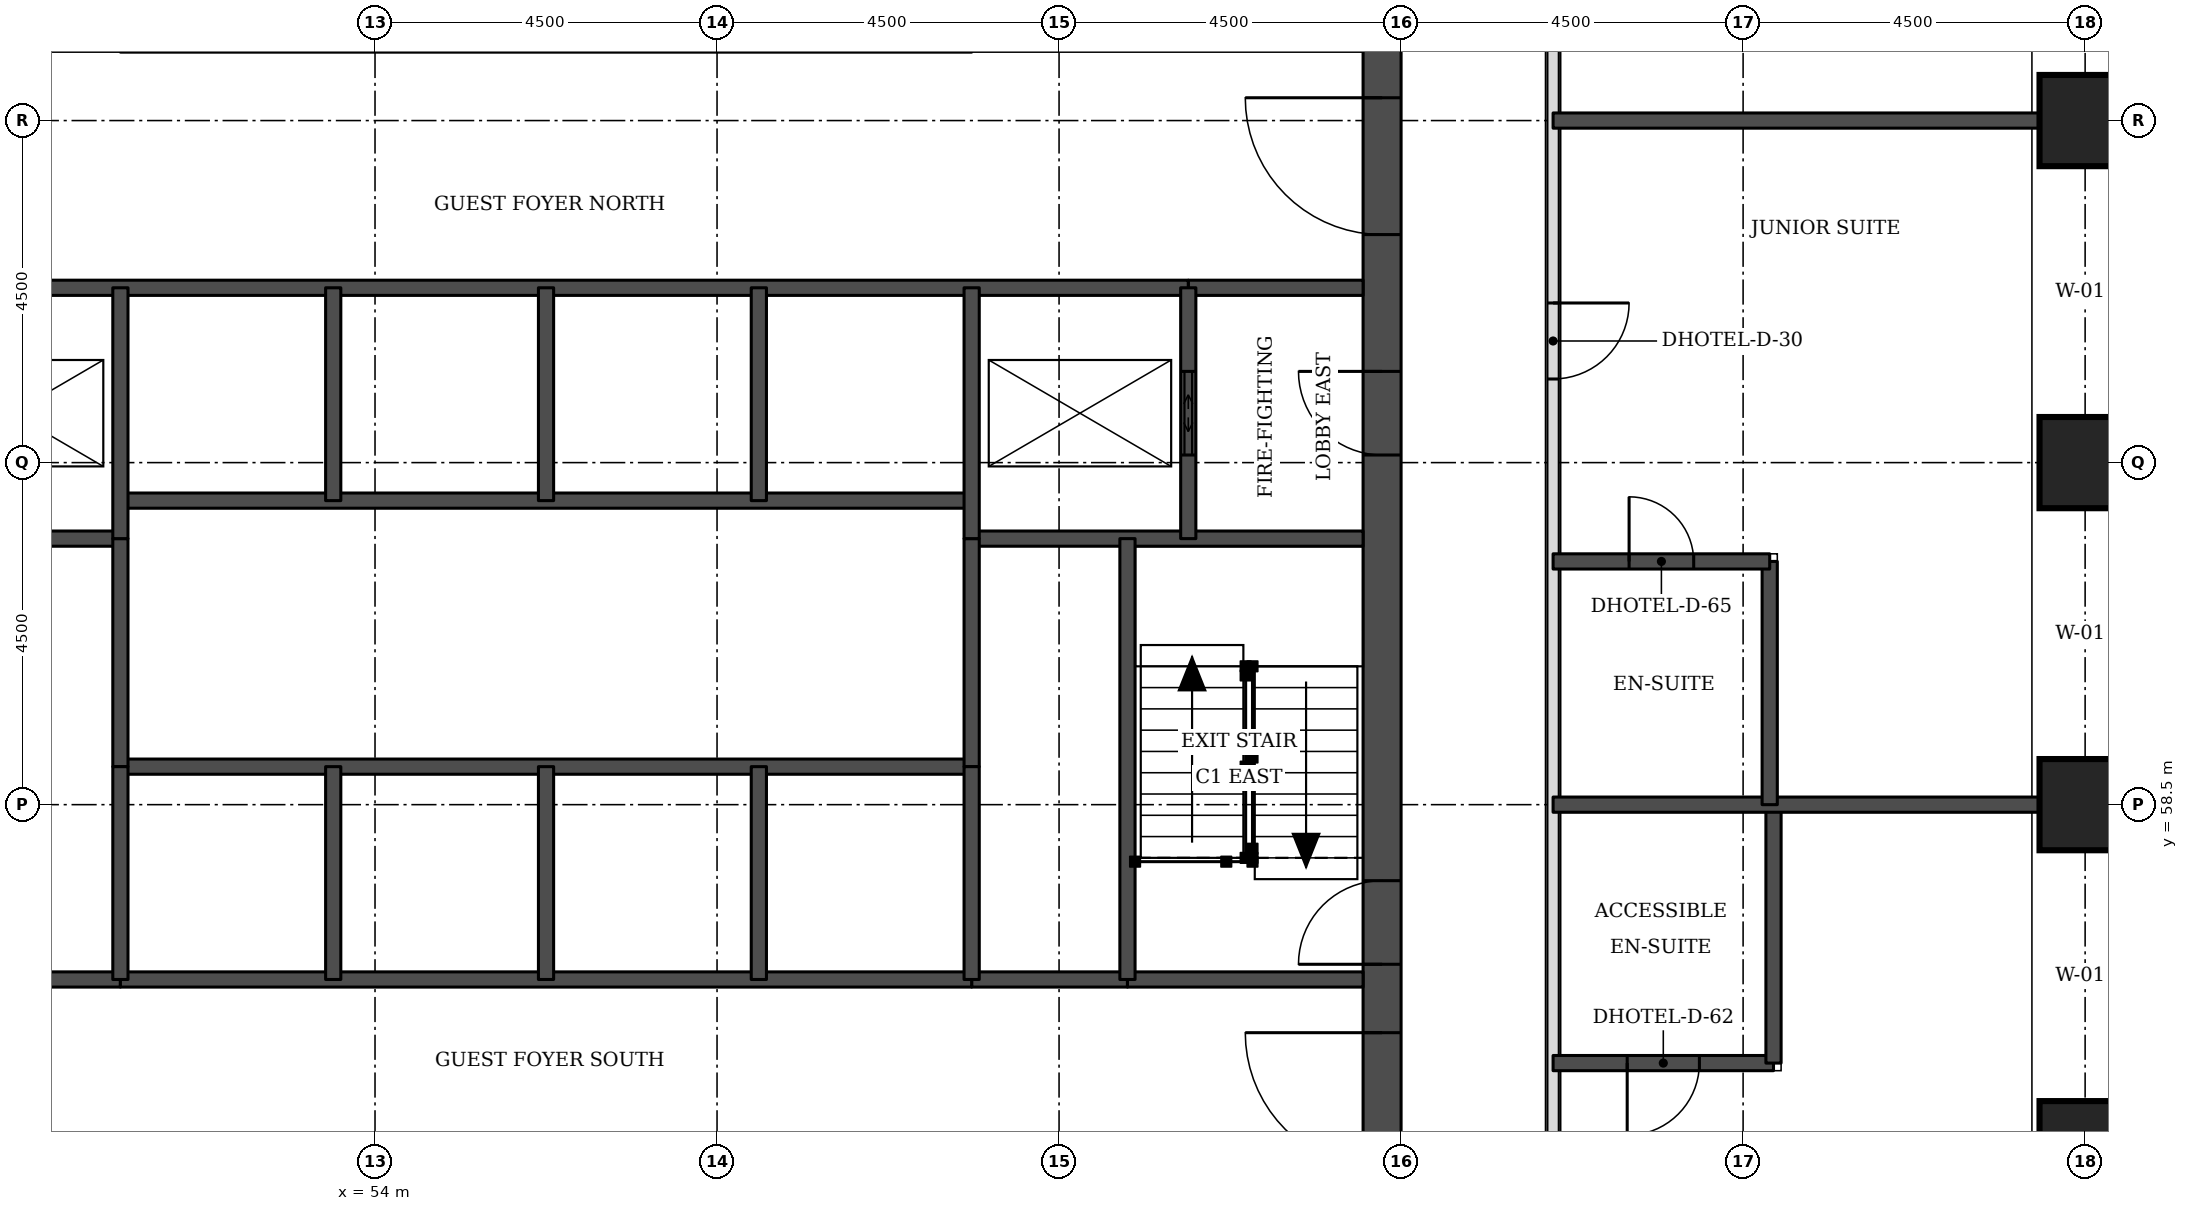
"""IFC4 building model, lengths in metres.
Left out: names, types, materials, properties, quantities, classifications, styles, units other than length and angle.
Written with IfcOpenShell. Run it as: python <this file> out.ifc"""

import sys

from ifc_helpers import new_model, si_unit, direction, frame, frame_2d, origin, origin_2d, place, context, subcontext, project, spatial, rectangle, extrude, element, fill, save


model = new_model("IFC4")
c1 = context("Model", 3, precision=1e-05, world=origin(), true_north=direction((0.0, 1.0)))
c2 = subcontext(c1, "Body", "Model", "MODEL_VIEW")
j1 = project(units=[si_unit("LENGTHUNIT", "METRE"), si_unit("PLANEANGLEUNIT", "RADIAN")], contexts=[c1])
p1 = place(None, origin())
s1 = spatial("IfcSite", under=j1, at=p1, CompositionType="ELEMENT")
p2 = place(p1, origin())
s2 = spatial("IfcBuilding", under=s1, at=p2, CompositionType="ELEMENT")
p3 = place(p2, frame((0.0, 0.0, 36.3)))
s3 = spatial("IfcBuildingStorey", under=s2, at=p3, CompositionType="ELEMENT", Elevation=36.3)
for number, where, z_axis, x_axis in (
    (1, (76.5, 54.0, 0.0), (0.0, 0.0, 1.0), (1.0, 0.0, 0.0)),
    (2, (76.5, 58.5, 0.0), (0.0, 0.0, 1.0), (1.0, 0.0, 0.0)),
    (3, (76.5, 63.0, 0.0), (0.0, 0.0, 1.0), (1.0, 0.0, 0.0)),
    (4, (76.5, 67.5, 0.0), (0.0, 0.0, 1.0), (1.0, 0.0, 0.0)),
):
    element("IfcColumn", number, at=place(p3, frame(where, z_axis=z_axis, x_axis=x_axis)), inside=s3, PredefinedType="COLUMN", context=c2, shape_type="SweptSolid", body=[
        extrude(rectangle(XDim=1.2, YDim=1.2, at=origin_2d()), origin(), (0.0, 0.0, 1.0), 3.3),
    ])
p4 = place(p3, frame((67.25, 49.5, 0.0), z_axis=(0.0, 0.0, 1.0), x_axis=(0.0, 1.0, 0.0)))
e5 = element("IfcWall", 5, at=p4, inside=s3, PredefinedType="SHEAR", context=c2, shape_type="SweptSolid", body=[
    extrude(rectangle(XDim=22.5, YDim=0.5, at=frame_2d((11.25, 0.0))), origin(), (0.0, 0.0, 1.0), 3.3),
])
p5 = place(p4, frame((4.2, 0.0, 0.0)))
e6 = element("IfcOpeningElement", 6, at=p5, cuts=e5, PredefinedType="OPENING", context=c2, shape_type="SweptSolid", body=[
    extrude(rectangle(XDim=1.8, YDim=2.1, at=frame_2d((0.9, 1.05))), frame((0.0, 0.26, 0.0), z_axis=(0.0, -1.0, 0.0), x_axis=(1.0, 0.0, 0.0)), (0.0, 0.0, 1.0), 0.52),
])
p6 = place(p4, frame((6.9, 0.0, 0.0)))
e7 = element("IfcOpeningElement", 7, at=p6, cuts=e5, PredefinedType="OPENING", context=c2, shape_type="SweptSolid", body=[
    extrude(rectangle(XDim=1.1, YDim=2.1, at=frame_2d((0.55, 1.05))), frame((0.0, 0.26, 0.0), z_axis=(0.0, -1.0, 0.0), x_axis=(1.0, 0.0, 0.0)), (0.0, 0.0, 1.0), 0.52),
])
p7 = place(p4, frame((13.6, 0.0, 0.0)))
e8 = element("IfcOpeningElement", 8, at=p7, cuts=e5, PredefinedType="OPENING", context=c2, shape_type="SweptSolid", body=[
    extrude(rectangle(XDim=1.1, YDim=2.1, at=frame_2d((0.55, 1.05))), frame((0.0, 0.26, 0.0), z_axis=(0.0, -1.0, 0.0), x_axis=(1.0, 0.0, 0.0)), (0.0, 0.0, 1.0), 0.52),
])
p8 = place(p4, frame((16.5, 0.0, 0.0)))
e9 = element("IfcOpeningElement", 9, at=p8, cuts=e5, PredefinedType="OPENING", context=c2, shape_type="SweptSolid", body=[
    extrude(rectangle(XDim=1.8, YDim=2.1, at=frame_2d((0.9, 1.05))), frame((0.0, 0.26, 0.0), z_axis=(0.0, -1.0, 0.0), x_axis=(1.0, 0.0, 0.0)), (0.0, 0.0, 1.0), 0.52),
])
p9 = place(p3, frame((69.5, 47.5, 0.0), z_axis=(0.0, 0.0, 1.0), x_axis=(0.0, 1.0, 0.0)))
e10 = element("IfcWall", 10, at=p9, inside=s3, PredefinedType="PARTITIONING", context=c2, shape_type="SweptSolid", body=[
    extrude(rectangle(XDim=26.5, YDim=0.15, at=frame_2d((13.25, 0.0))), origin(), (0.0, 0.0, 1.0), 3.08),
])
p10 = place(p9, frame((22.65, 0.0, 0.0)))
e11 = element("IfcOpeningElement", 11, at=p10, cuts=e10, PredefinedType="OPENING", context=c2, shape_type="SweptSolid", body=[
    extrude(rectangle(XDim=1.0, YDim=2.1, at=frame_2d((0.5, 1.05))), frame((0.0, 0.085, 0.0), z_axis=(0.0, -1.0, 0.0), x_axis=(1.0, 0.0, 0.0)), (0.0, 0.0, 1.0), 0.17),
])
p11 = place(p9, frame((16.6, 0.0, 0.0)))
e12 = element("IfcOpeningElement", 12, at=p11, cuts=e10, PredefinedType="OPENING", context=c2, shape_type="SweptSolid", body=[
    extrude(rectangle(XDim=1.0, YDim=2.1, at=frame_2d((0.5, 1.05))), frame((0.0, 0.085, 0.0), z_axis=(0.0, -1.0, 0.0), x_axis=(1.0, 0.0, 0.0)), (0.0, 0.0, 1.0), 0.17),
])
p12 = place(p9, frame((4.25, 0.0, 0.0)))
e13 = element("IfcOpeningElement", 13, at=p12, cuts=e10, PredefinedType="OPENING", context=c2, shape_type="SweptSolid", body=[
    extrude(rectangle(XDim=1.1, YDim=2.1, at=frame_2d((0.55, 1.05))), frame((0.0, 0.085, 0.0), z_axis=(0.0, -1.0, 0.0), x_axis=(1.0, 0.0, 0.0)), (0.0, 0.0, 1.0), 0.17),
])
p13 = place(p9, frame((0.55, 0.0, 0.0)))
e14 = element("IfcOpeningElement", 14, at=p13, cuts=e10, PredefinedType="OPENING", context=c2, shape_type="SweptSolid", body=[
    extrude(rectangle(XDim=1.0, YDim=2.1, at=frame_2d((0.5, 1.05))), frame((0.0, 0.085, 0.0), z_axis=(0.0, -1.0, 0.0), x_axis=(1.0, 0.0, 0.0)), (0.0, 0.0, 1.0), 0.17),
])
p14 = place(p3, frame((69.5, 55.1, 0.0), z_axis=(0.0, 0.0, 1.0), x_axis=(1.0, 0.0, 0.0)))
e15 = element("IfcWall", 15, at=p14, inside=s3, PredefinedType="SOLIDWALL", context=c2, shape_type="SweptSolid", body=[
    extrude(rectangle(XDim=2.9, YDim=0.2, at=frame_2d((1.45, 0.0))), origin(), (0.0, 0.0, 1.0), 3.08),
])
p15 = place(p14, frame((0.975, 0.0, 0.0)))
e16 = element("IfcOpeningElement", 16, at=p15, cuts=e15, PredefinedType="OPENING", context=c2, shape_type="SweptSolid", body=[
    extrude(rectangle(XDim=0.95, YDim=2.1, at=frame_2d((0.475, 1.05))), frame((0.0, 0.11, 0.0), z_axis=(0.0, -1.0, 0.0), x_axis=(1.0, 0.0, 0.0)), (0.0, 0.0, 1.0), 0.22),
])
p16 = place(p3, frame((72.4, 55.1, 0.0), z_axis=(0.0, 0.0, 1.0), x_axis=(0.0, 1.0, 0.0)))
e17 = element("IfcWall", 17, at=p16, inside=s3, PredefinedType="SOLIDWALL", context=c2, shape_type="SweptSolid", body=[
    extrude(rectangle(XDim=3.4, YDim=0.2, at=frame_2d((1.7, 0.0))), origin(), (0.0, 0.0, 1.0), 3.08),
])
p17 = place(p3, frame((69.5, 58.5, 0.0), z_axis=(0.0, 0.0, 1.0), x_axis=(1.0, 0.0, 0.0)))
e18 = element("IfcWall", 18, at=p17, inside=s3, PredefinedType="SOLIDWALL", context=c2, shape_type="SweptSolid", body=[
    extrude(rectangle(XDim=6.4, YDim=0.2, at=frame_2d((3.2, 0.0))), origin(), (0.0, 0.0, 1.0), 3.08),
])
p18 = place(p3, frame((72.35, 58.5, 0.0), z_axis=(0.0, 0.0, 1.0), x_axis=(0.0, 1.0, 0.0)))
e19 = element("IfcWall", 19, at=p18, inside=s3, PredefinedType="SOLIDWALL", context=c2, shape_type="SweptSolid", body=[
    extrude(rectangle(XDim=3.2, YDim=0.2, at=frame_2d((1.6, 0.0))), origin(), (0.0, 0.0, 1.0), 3.08),
])
p19 = place(p3, frame((69.5, 61.7, 0.0), z_axis=(0.0, 0.0, 1.0), x_axis=(1.0, 0.0, 0.0)))
e20 = element("IfcWall", 20, at=p19, inside=s3, PredefinedType="SOLIDWALL", context=c2, shape_type="SweptSolid", body=[
    extrude(rectangle(XDim=2.85, YDim=0.2, at=frame_2d((1.425, 0.0))), origin(), (0.0, 0.0, 1.0), 3.08),
])
p20 = place(p19, frame((1.0, 0.0, 0.0)))
e21 = element("IfcOpeningElement", 21, at=p20, cuts=e20, PredefinedType="OPENING", context=c2, shape_type="SweptSolid", body=[
    extrude(rectangle(XDim=0.85, YDim=2.1, at=frame_2d((0.425, 1.05))), frame((0.0, 0.11, 0.0), z_axis=(0.0, -1.0, 0.0), x_axis=(1.0, 0.0, 0.0)), (0.0, 0.0, 1.0), 0.22),
])
p21 = place(p3, frame((69.5, 67.5, 0.0), z_axis=(0.0, 0.0, 1.0), x_axis=(1.0, 0.0, 0.0)))
e22 = element("IfcWall", 22, at=p21, inside=s3, PredefinedType="SOLIDWALL", context=c2, shape_type="SweptSolid", body=[
    extrude(rectangle(XDim=6.4, YDim=0.2, at=frame_2d((3.2, 0.0))), origin(), (0.0, 0.0, 1.0), 3.08),
])
for number, where, z_axis, x_axis in (
    (23, (48.6, 56.2, 0.0), (0.0, 0.0, 1.0), (1.0, 0.0, 0.0)),
    (24, (61.85, 56.2, 0.0), (0.0, 0.0, 1.0), (1.0, 0.0, 0.0)),
):
    element("IfcWall", number, at=place(p3, frame(where, z_axis=z_axis, x_axis=x_axis)), inside=s3, PredefinedType="SOLIDWALL", context=c2, shape_type="SweptSolid", body=[
        extrude(rectangle(XDim=2.05, YDim=0.2, at=frame_2d((1.025, 0.0))), origin(), (0.0, 0.0, 1.0), 3.08),
    ])
p22 = place(p3, frame((50.65, 56.2, 0.0), z_axis=(0.0, 0.0, 1.0), x_axis=(1.0, 0.0, 0.0)))
e25 = element("IfcWall", 25, at=p22, inside=s3, PredefinedType="SOLIDWALL", context=c2, shape_type="SweptSolid", body=[
    extrude(rectangle(XDim=11.2, YDim=0.2, at=frame_2d((5.6, 0.0))), origin(), (0.0, 0.0, 1.0), 3.08),
])
p23 = place(p3, frame((63.9, 56.2, 0.0), z_axis=(0.0, 0.0, 1.0), x_axis=(1.0, 0.0, 0.0)))
e26 = element("IfcWall", 26, at=p23, inside=s3, PredefinedType="SOLIDWALL", context=c2, shape_type="SweptSolid", body=[
    extrude(rectangle(XDim=3.1, YDim=0.2, at=frame_2d((1.55, 0.0))), origin(), (0.0, 0.0, 1.0), 3.08),
])
p24 = place(p3, frame((50.65, 59.0, 0.0), z_axis=(0.0, 0.0, 1.0), x_axis=(1.0, 0.0, 0.0)))
e27 = element("IfcWall", 27, at=p24, inside=s3, PredefinedType="SOLIDWALL", context=c2, shape_type="SweptSolid", body=[
    extrude(rectangle(XDim=11.2, YDim=0.2, at=frame_2d((5.6, 0.0))), origin(), (0.0, 0.0, 1.0), 3.3),
])
for number, where, z_axis, x_axis in (
    (28, (45.5, 62.0, 0.0), (0.0, 0.0, 1.0), (1.0, 0.0, 0.0)),
    (29, (61.85, 62.0, 0.0), (0.0, 0.0, 1.0), (1.0, 0.0, 0.0)),
):
    element("IfcWall", number, at=place(p3, frame(where, z_axis=z_axis, x_axis=x_axis)), inside=s3, PredefinedType="SOLIDWALL", context=c2, shape_type="SweptSolid", body=[
        extrude(rectangle(XDim=5.15, YDim=0.2, at=frame_2d((2.575, 0.0))), origin(), (0.0, 0.0, 1.0), 3.08),
    ])
p25 = place(p3, frame((50.65, 62.5, 0.0), z_axis=(0.0, 0.0, 1.0), x_axis=(1.0, 0.0, 0.0)))
e30 = element("IfcWall", 30, at=p25, inside=s3, PredefinedType="SOLIDWALL", context=c2, shape_type="SweptSolid", body=[
    extrude(rectangle(XDim=11.2, YDim=0.2, at=frame_2d((5.6, 0.0))), origin(), (0.0, 0.0, 1.0), 3.3),
])
p26 = place(p3, frame((64.7, 65.3, 0.0), z_axis=(0.0, 0.0, 1.0), x_axis=(1.0, 0.0, 0.0)))
e31 = element("IfcWall", 31, at=p26, inside=s3, PredefinedType="SOLIDWALL", context=c2, shape_type="SweptSolid", body=[
    extrude(rectangle(XDim=2.3, YDim=0.2, at=frame_2d((1.15, 0.0))), origin(), (0.0, 0.0, 1.0), 3.08),
])
p27 = place(p3, frame((47.8, 65.3, 0.0), z_axis=(0.0, 0.0, 1.0), x_axis=(1.0, 0.0, 0.0)))
e32 = element("IfcWall", 32, at=p27, inside=s3, PredefinedType="SOLIDWALL", context=c2, shape_type="SweptSolid", body=[
    extrude(rectangle(XDim=16.9, YDim=0.2, at=frame_2d((8.45, 0.0))), origin(), (0.0, 0.0, 1.0), 3.08),
])
p28 = place(p3, frame((50.65, 59.0, 0.0), z_axis=(0.0, 0.0, 1.0), x_axis=(0.0, 1.0, 0.0)))
e33 = element("IfcWall", 33, at=p28, inside=s3, PredefinedType="SOLIDWALL", context=c2, shape_type="SweptSolid", body=[
    extrude(rectangle(XDim=3.0, YDim=0.2, at=frame_2d((1.5, 0.0))), origin(), (0.0, 0.0, 1.0), 3.3),
])
p29 = place(p3, frame((50.65, 56.2, 0.0), z_axis=(0.0, 0.0, 1.0), x_axis=(0.0, 1.0, 0.0)))
e34 = element("IfcWall", 34, at=p29, inside=s3, PredefinedType="SOLIDWALL", context=c2, shape_type="SweptSolid", body=[
    extrude(rectangle(XDim=2.8, YDim=0.2, at=frame_2d((1.4, 0.0))), origin(), (0.0, 0.0, 1.0), 3.08),
])
p30 = place(p3, frame((50.65, 62.0, 0.0), z_axis=(0.0, 0.0, 1.0), x_axis=(0.0, 1.0, 0.0)))
e35 = element("IfcWall", 35, at=p30, inside=s3, PredefinedType="SOLIDWALL", context=c2, shape_type="SweptSolid", body=[
    extrude(rectangle(XDim=3.3, YDim=0.2, at=frame_2d((1.65, 0.0))), origin(), (0.0, 0.0, 1.0), 3.08),
])
for number, where, z_axis, x_axis in (
    (36, (53.45, 56.2, 0.0), (0.0, 0.0, 1.0), (0.0, 1.0, 0.0)),
    (37, (53.45, 62.5, 0.0), (0.0, 0.0, 1.0), (0.0, 1.0, 0.0)),
    (38, (56.25, 56.2, 0.0), (0.0, 0.0, 1.0), (0.0, 1.0, 0.0)),
    (39, (56.25, 62.5, 0.0), (0.0, 0.0, 1.0), (0.0, 1.0, 0.0)),
    (40, (59.05, 56.2, 0.0), (0.0, 0.0, 1.0), (0.0, 1.0, 0.0)),
    (41, (59.05, 62.5, 0.0), (0.0, 0.0, 1.0), (0.0, 1.0, 0.0)),
):
    element("IfcWall", number, at=place(p3, frame(where, z_axis=z_axis, x_axis=x_axis)), inside=s3, PredefinedType="SOLIDWALL", context=c2, shape_type="SweptSolid", body=[
        extrude(rectangle(XDim=2.8, YDim=0.2, at=frame_2d((1.4, 0.0))), origin(), (0.0, 0.0, 1.0), 3.08),
    ])
p31 = place(p3, frame((61.85, 59.0, 0.0), z_axis=(0.0, 0.0, 1.0), x_axis=(0.0, 1.0, 0.0)))
e42 = element("IfcWall", 42, at=p31, inside=s3, PredefinedType="SOLIDWALL", context=c2, shape_type="SweptSolid", body=[
    extrude(rectangle(XDim=3.0, YDim=0.2, at=frame_2d((1.5, 0.0))), origin(), (0.0, 0.0, 1.0), 3.3),
])
p32 = place(p3, frame((61.85, 56.2, 0.0), z_axis=(0.0, 0.0, 1.0), x_axis=(0.0, 1.0, 0.0)))
e43 = element("IfcWall", 43, at=p32, inside=s3, PredefinedType="SOLIDWALL", context=c2, shape_type="SweptSolid", body=[
    extrude(rectangle(XDim=2.8, YDim=0.2, at=frame_2d((1.4, 0.0))), origin(), (0.0, 0.0, 1.0), 3.08),
])
p33 = place(p3, frame((61.85, 62.0, 0.0), z_axis=(0.0, 0.0, 1.0), x_axis=(0.0, 1.0, 0.0)))
e44 = element("IfcWall", 44, at=p33, inside=s3, PredefinedType="SOLIDWALL", context=c2, shape_type="SweptSolid", body=[
    extrude(rectangle(XDim=3.3, YDim=0.2, at=frame_2d((1.65, 0.0))), origin(), (0.0, 0.0, 1.0), 3.08),
])
p34 = place(p3, frame((63.9, 56.2, 0.0), z_axis=(0.0, 0.0, 1.0), x_axis=(0.0, 1.0, 0.0)))
e45 = element("IfcWall", 45, at=p34, inside=s3, PredefinedType="SOLIDWALL", context=c2, shape_type="SweptSolid", body=[
    extrude(rectangle(XDim=5.8, YDim=0.2, at=frame_2d((2.9, 0.0))), origin(), (0.0, 0.0, 1.0), 3.08),
])
p35 = place(p3, frame((64.7, 62.0, 0.0), z_axis=(0.0, 0.0, 1.0), x_axis=(0.0, 1.0, 0.0)))
e46 = element("IfcWall", 46, at=p35, inside=s3, PredefinedType="SOLIDWALL", context=c2, shape_type="SweptSolid", body=[
    extrude(rectangle(XDim=3.3, YDim=0.2, at=frame_2d((1.65, 0.0))), origin(), (0.0, 0.0, 1.0), 3.08),
])
p36 = place(p35, frame((1.1, 0.0, 0.0)))
e47 = element("IfcOpeningElement", 47, at=p36, cuts=e46, PredefinedType="OPENING", context=c2, shape_type="SweptSolid", body=[
    extrude(rectangle(XDim=1.1, YDim=2.1, at=frame_2d((0.55, 1.05))), frame((0.0, 0.11, 0.0), z_axis=(0.0, -1.0, 0.0), x_axis=(1.0, 0.0, 0.0)), (0.0, 0.0, 1.0), 0.22),
])
p37 = place(p11, frame((1.0, 0.0, 0.0), z_axis=(0.0, 0.0, 1.0), x_axis=(-1.0, 0.0, 0.0)))
e48 = element("IfcDoor", 48, at=p37, inside=s3, OperationType="SINGLE_SWING_LEFT", PredefinedType="DOOR", context=c2, shape_type="SweptSolid", body=[
    extrude(rectangle(XDim=1.0, YDim=2.1, at=frame_2d((0.5, 1.05))), frame((0.0, 0.025, 0.0), z_axis=(0.0, -1.0, 0.0), x_axis=(1.0, 0.0, 0.0)), (0.0, 0.0, 1.0), 0.05),
])
fill(e12, e48)
p38 = place(p20, origin())
e49 = element("IfcDoor", 49, at=p38, inside=s3, OperationType="SINGLE_SWING_LEFT", PredefinedType="DOOR", context=c2, shape_type="SweptSolid", body=[
    extrude(rectangle(XDim=0.85, YDim=2.1, at=frame_2d((0.425, 1.05))), frame((0.0, 0.025, 0.0), z_axis=(0.0, -1.0, 0.0), x_axis=(1.0, 0.0, 0.0)), (0.0, 0.0, 1.0), 0.05),
])
fill(e21, e49)
p39 = place(p15, frame((0.95, 0.0, 0.0), z_axis=(0.0, 0.0, 1.0), x_axis=(-1.0, 0.0, 0.0)))
e50 = element("IfcDoor", 50, at=p39, inside=s3, OperationType="SINGLE_SWING_RIGHT", PredefinedType="DOOR", context=c2, shape_type="SweptSolid", body=[
    extrude(rectangle(XDim=0.95, YDim=2.1, at=frame_2d((0.475, 1.05))), frame((0.0, 0.025, 0.0), z_axis=(0.0, -1.0, 0.0), x_axis=(1.0, 0.0, 0.0)), (0.0, 0.0, 1.0), 0.05),
])
fill(e16, e50)
p40 = place(p36, origin())
e51 = element("IfcDoor", 51, at=p40, inside=s3, OperationType="DOUBLE_DOOR_SLIDING", PredefinedType="DOOR", context=c2, shape_type="SweptSolid", body=[
    extrude(rectangle(XDim=1.1, YDim=2.1, at=frame_2d((0.55, 1.05))), frame((0.0, 0.025, 0.0), z_axis=(0.0, -1.0, 0.0), x_axis=(1.0, 0.0, 0.0)), (0.0, 0.0, 1.0), 0.05),
])
fill(e47, e51)
p41 = place(p5, origin())
e52 = element("IfcDoor", 52, at=p41, inside=s3, OperationType="SINGLE_SWING_RIGHT", PredefinedType="DOOR", context=c2, shape_type="SweptSolid", body=[
    extrude(rectangle(XDim=1.8, YDim=2.1, at=frame_2d((0.9, 1.05))), frame((0.0, 0.025, 0.0), z_axis=(0.0, -1.0, 0.0), x_axis=(1.0, 0.0, 0.0)), (0.0, 0.0, 1.0), 0.05),
])
fill(e6, e52)
p42 = place(p6, origin())
e53 = element("IfcDoor", 53, at=p42, inside=s3, OperationType="SINGLE_SWING_LEFT", PredefinedType="DOOR", context=c2, shape_type="SweptSolid", body=[
    extrude(rectangle(XDim=1.1, YDim=2.1, at=frame_2d((0.55, 1.05))), frame((0.0, 0.025, 0.0), z_axis=(0.0, -1.0, 0.0), x_axis=(1.0, 0.0, 0.0)), (0.0, 0.0, 1.0), 0.05),
])
fill(e7, e53)
p43 = place(p7, origin())
e54 = element("IfcDoor", 54, at=p43, inside=s3, OperationType="SINGLE_SWING_RIGHT", PredefinedType="DOOR", context=c2, shape_type="SweptSolid", body=[
    extrude(rectangle(XDim=1.1, YDim=2.1, at=frame_2d((0.55, 1.05))), frame((0.0, 0.025, 0.0), z_axis=(0.0, -1.0, 0.0), x_axis=(1.0, 0.0, 0.0)), (0.0, 0.0, 1.0), 0.05),
])
fill(e8, e54)
p44 = place(p8, origin())
e55 = element("IfcDoor", 55, at=p44, inside=s3, OperationType="SINGLE_SWING_RIGHT", PredefinedType="DOOR", context=c2, shape_type="SweptSolid", body=[
    extrude(rectangle(XDim=1.8, YDim=2.1, at=frame_2d((0.9, 1.05))), frame((0.0, 0.025, 0.0), z_axis=(0.0, -1.0, 0.0), x_axis=(1.0, 0.0, 0.0)), (0.0, 0.0, 1.0), 0.05),
])
fill(e9, e55)
save(model, sys.argv[1])
